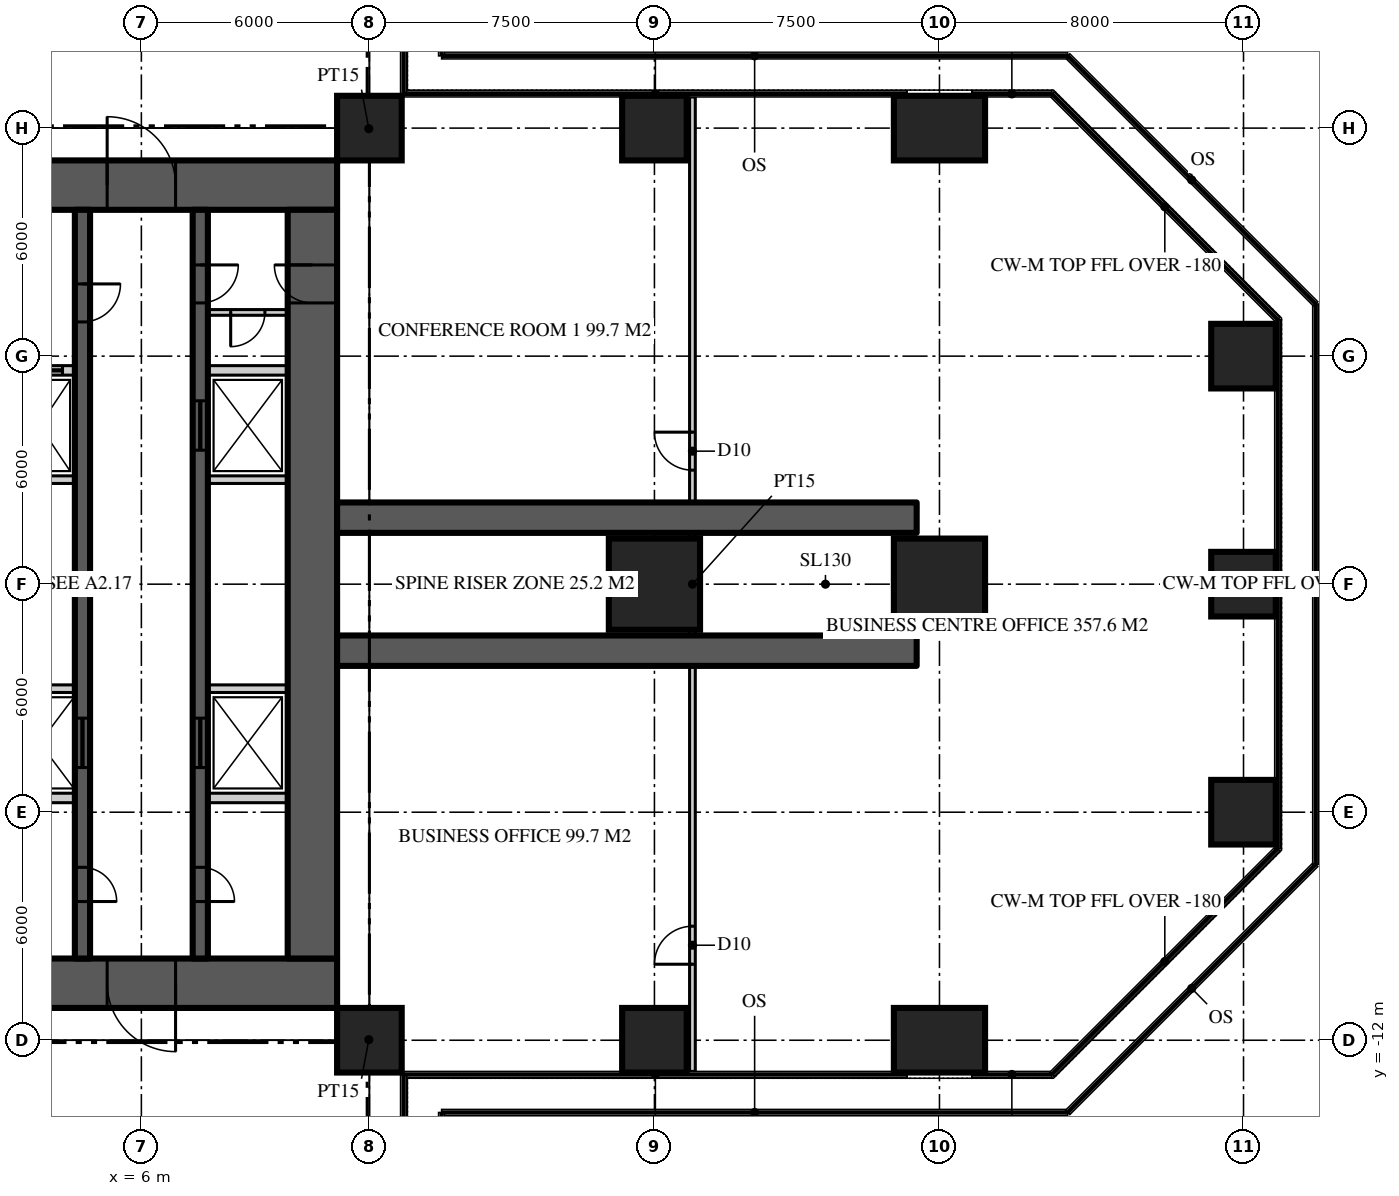
"""IFC4 building model, lengths in metres.
Left out: names, types, materials, properties, quantities, classifications, styles, units other than length and angle.
Written with IfcOpenShell. Run it as: python <this file> out.ifc"""

import sys

from ifc_helpers import new_model, si_unit, direction, frame, frame_2d, origin, origin_2d, place, context, subcontext, project, spatial, rectangle, extrude, element, fill, save


model = new_model("IFC4")
c1 = context("Model", 3, precision=1e-05, world=origin(), true_north=direction((0.0, 1.0)))
c2 = subcontext(c1, "Body", "Model", "MODEL_VIEW")
j1 = project(units=[si_unit("LENGTHUNIT", "METRE"), si_unit("PLANEANGLEUNIT", "RADIAN")], contexts=[c1])
p1 = place(None, origin())
s1 = spatial("IfcSite", under=j1, at=p1, CompositionType="ELEMENT")
p2 = place(p1, origin())
s2 = spatial("IfcBuilding", under=s1, at=p2, CompositionType="ELEMENT")
p3 = place(p2, frame((0.0, 0.0, 113.7)))
s3 = spatial("IfcBuildingStorey", under=s2, at=p3, CompositionType="ELEMENT", Elevation=113.7)
p4 = place(p3, frame((-11.15, 10.5, 0.0), z_axis=(0.0, 0.0, 1.0), x_axis=(1.0, 0.0, 0.0)))
e1 = element("IfcWall", 1, at=p4, inside=s3, PredefinedType="SHEAR", context=c2, shape_type="SweptSolid", body=[
    extrude(rectangle(XDim=22.3, YDim=1.3, at=frame_2d((11.15, 0.0))), origin(), (0.0, 0.0, 1.0), 4.5),
])
p5 = place(p4, frame((4.25, 0.0, 0.0)))
e2 = element("IfcOpeningElement", 2, at=p5, cuts=e1, PredefinedType="OPENING", context=c2, shape_type="SweptSolid", body=[
    extrude(rectangle(XDim=1.8, YDim=2.2, at=frame_2d((0.9, 1.1))), frame((0.0, 0.66, 0.0), z_axis=(0.0, -1.0, 0.0), x_axis=(1.0, 0.0, 0.0)), (0.0, 0.0, 1.0), 1.32),
])
p6 = place(p4, frame((16.25, 0.0, 0.0)))
e3 = element("IfcOpeningElement", 3, at=p6, cuts=e1, PredefinedType="OPENING", context=c2, shape_type="SweptSolid", body=[
    extrude(rectangle(XDim=1.8, YDim=2.2, at=frame_2d((0.9, 1.1))), frame((0.0, 0.66, 0.0), z_axis=(0.0, -1.0, 0.0), x_axis=(1.0, 0.0, 0.0)), (0.0, 0.0, 1.0), 1.32),
])
p7 = place(p3, frame((11.15, -10.5, 0.0), z_axis=(0.0, 0.0, 1.0), x_axis=(-1.0, 0.0, 0.0)))
e4 = element("IfcWall", 4, at=p7, inside=s3, PredefinedType="SHEAR", context=c2, shape_type="SweptSolid", body=[
    extrude(rectangle(XDim=22.3, YDim=1.3, at=frame_2d((11.15, 0.0))), origin(), (0.0, 0.0, 1.0), 4.5),
])
p8 = place(p7, frame((16.25, 0.0, 0.0)))
e5 = element("IfcOpeningElement", 5, at=p8, cuts=e4, PredefinedType="OPENING", context=c2, shape_type="SweptSolid", body=[
    extrude(rectangle(XDim=1.8, YDim=2.2, at=frame_2d((0.9, 1.1))), frame((0.0, 0.66, 0.0), z_axis=(0.0, -1.0, 0.0), x_axis=(1.0, 0.0, 0.0)), (0.0, 0.0, 1.0), 1.32),
])
p9 = place(p7, frame((4.25, 0.0, 0.0)))
e6 = element("IfcOpeningElement", 6, at=p9, cuts=e4, PredefinedType="OPENING", context=c2, shape_type="SweptSolid", body=[
    extrude(rectangle(XDim=1.8, YDim=2.2, at=frame_2d((0.9, 1.1))), frame((0.0, 0.66, 0.0), z_axis=(0.0, -1.0, 0.0), x_axis=(1.0, 0.0, 0.0)), (0.0, 0.0, 1.0), 1.32),
])
p10 = place(p3, frame((10.5, -9.85, 0.0), z_axis=(0.0, 0.0, 1.0), x_axis=(0.0, 1.0, 0.0)))
e7 = element("IfcWall", 7, at=p10, inside=s3, PredefinedType="SHEAR", context=c2, shape_type="SweptSolid", body=[
    extrude(rectangle(XDim=19.7, YDim=1.3, at=frame_2d((9.85, 0.0))), origin(), (0.0, 0.0, 1.0), 4.5),
])
p11 = place(p10, frame((17.25, 0.0, 0.0)))
e8 = element("IfcOpeningElement", 8, at=p11, cuts=e7, PredefinedType="OPENING", context=c2, shape_type="SweptSolid", body=[
    extrude(rectangle(XDim=1.0, YDim=2.2, at=frame_2d((0.5, 1.1))), frame((0.0, 0.66, 0.0), z_axis=(0.0, -1.0, 0.0), x_axis=(1.0, 0.0, 0.0)), (0.0, 0.0, 1.0), 1.32),
])
for number, where, z_axis, x_axis in (
    (9, (11.15, -1.75, 0.0), (0.0, 0.0, 1.0), (1.0, 0.0, 0.0)),
    (10, (11.15, 1.75, 0.0), (0.0, 0.0, 1.0), (1.0, 0.0, 0.0)),
):
    element("IfcWall", number, at=place(p3, frame(where, z_axis=z_axis, x_axis=x_axis)), inside=s3, PredefinedType="SHEAR", context=c2, shape_type="SweptSolid", body=[
        extrude(rectangle(XDim=15.25, YDim=0.8, at=frame_2d((7.625, 0.0))), origin(), (0.0, 0.0, 1.0), 4.5),
    ])
for number, where, z_axis, x_axis in (
    (11, (12.0, -12.0, 0.0), (0.0, 0.0, 1.0), (1.0, 0.0, 0.0)),
    (12, (19.5, -12.0, 0.0), (0.0, 0.0, 1.0), (1.0, 0.0, 0.0)),
):
    element("IfcColumn", number, at=place(p3, frame(where, z_axis=z_axis, x_axis=x_axis)), inside=s3, PredefinedType="COLUMN", context=c2, shape_type="SweptSolid", body=[
        extrude(rectangle(XDim=1.7, YDim=1.7, at=origin_2d()), origin(), (0.0, 0.0, 1.0), 4.5),
    ])
p12 = place(p3, frame((27.0, -12.0, 0.0), z_axis=(0.0, 0.0, 1.0), x_axis=(0.0, 1.0, 0.0)))
e13 = element("IfcColumn", 13, at=p12, inside=s3, PredefinedType="COLUMN", context=c2, shape_type="SweptSolid", body=[
    extrude(rectangle(XDim=1.7, YDim=2.4, at=origin_2d()), origin(), (0.0, 0.0, 1.0), 4.5),
])
p13 = place(p3, frame((35.0, -6.0, 0.0), z_axis=(0.0, 0.0, 1.0), x_axis=(1.0, 0.0, 0.0)))
e14 = element("IfcColumn", 14, at=p13, inside=s3, PredefinedType="COLUMN", context=c2, shape_type="SweptSolid", body=[
    extrude(rectangle(XDim=1.7, YDim=1.7, at=origin_2d()), origin(), (0.0, 0.0, 1.0), 4.5),
])
for number, where, z_axis, x_axis in (
    (15, (19.5, 0.0, 0.0), (0.0, 0.0, 1.0), (1.0, 0.0, 0.0)),
    (16, (27.0, 0.0, 0.0), (0.0, 0.0, 1.0), (1.0, 0.0, 0.0)),
):
    element("IfcColumn", number, at=place(p3, frame(where, z_axis=z_axis, x_axis=x_axis)), inside=s3, PredefinedType="COLUMN", context=c2, shape_type="SweptSolid", body=[
        extrude(rectangle(XDim=2.4, YDim=2.4, at=origin_2d()), origin(), (0.0, 0.0, 1.0), 4.5),
    ])
for number, where, z_axis, x_axis in (
    (17, (35.0, 0.0, 0.0), (0.0, 0.0, 1.0), (1.0, 0.0, 0.0)),
    (18, (35.0, 6.0, 0.0), (0.0, 0.0, 1.0), (1.0, 0.0, 0.0)),
    (19, (12.0, 12.0, 0.0), (0.0, 0.0, 1.0), (1.0, 0.0, 0.0)),
    (20, (19.5, 12.0, 0.0), (0.0, 0.0, 1.0), (1.0, 0.0, 0.0)),
):
    element("IfcColumn", number, at=place(p3, frame(where, z_axis=z_axis, x_axis=x_axis)), inside=s3, PredefinedType="COLUMN", context=c2, shape_type="SweptSolid", body=[
        extrude(rectangle(XDim=1.7, YDim=1.7, at=origin_2d()), origin(), (0.0, 0.0, 1.0), 4.5),
    ])
p14 = place(p3, frame((27.0, 12.0, 0.0), z_axis=(0.0, 0.0, 1.0), x_axis=(0.0, 1.0, 0.0)))
e21 = element("IfcColumn", 21, at=p14, inside=s3, PredefinedType="COLUMN", context=c2, shape_type="SweptSolid", body=[
    extrude(rectangle(XDim=1.7, YDim=2.4, at=origin_2d()), origin(), (0.0, 0.0, 1.0), 4.5),
])
p15 = place(p3, frame((7.55, 9.85, 0.0), z_axis=(0.0, 0.0, 1.0), x_axis=(0.0, -1.0, 0.0)))
e22 = element("IfcWall", 22, at=p15, inside=s3, PredefinedType="SHEAR", context=c2, shape_type="SweptSolid", body=[
    extrude(rectangle(XDim=19.7, YDim=0.4, at=frame_2d((9.85, 0.0))), origin(), (0.0, 0.0, 1.0), 4.5),
])
p16 = place(p15, frame((1.45, 0.0, 0.0)))
e23 = element("IfcOpeningElement", 23, at=p16, cuts=e22, PredefinedType="OPENING", context=c2, shape_type="SweptSolid", body=[
    extrude(rectangle(XDim=1.0, YDim=2.2, at=frame_2d((0.5, 1.1))), frame((0.0, 0.21, 0.0), z_axis=(0.0, -1.0, 0.0), x_axis=(1.0, 0.0, 0.0)), (0.0, 0.0, 1.0), 0.42),
])
p17 = place(p15, frame((17.3, 0.0, 0.0)))
e24 = element("IfcOpeningElement", 24, at=p17, cuts=e22, PredefinedType="OPENING", context=c2, shape_type="SweptSolid", body=[
    extrude(rectangle(XDim=0.9, YDim=2.1, at=frame_2d((0.45, 1.05))), frame((0.0, 0.21, 0.0), z_axis=(0.0, -1.0, 0.0), x_axis=(1.0, 0.0, 0.0)), (0.0, 0.0, 1.0), 0.42),
])
p18 = place(p15, frame((5.025, 0.0, 0.0)))
e25 = element("IfcOpeningElement", 25, at=p18, cuts=e22, PredefinedType="OPENING", context=c2, shape_type="SweptSolid", body=[
    extrude(rectangle(XDim=1.3, YDim=2.2, at=frame_2d((0.65, 1.1))), frame((0.0, 0.21, 0.0), z_axis=(0.0, -1.0, 0.0), x_axis=(1.0, 0.0, 0.0)), (0.0, 0.0, 1.0), 0.42),
])
p19 = place(p15, frame((13.375, 0.0, 0.0)))
e26 = element("IfcOpeningElement", 26, at=p19, cuts=e22, PredefinedType="OPENING", context=c2, shape_type="SweptSolid", body=[
    extrude(rectangle(XDim=1.3, YDim=2.2, at=frame_2d((0.65, 1.1))), frame((0.0, 0.21, 0.0), z_axis=(0.0, -1.0, 0.0), x_axis=(1.0, 0.0, 0.0)), (0.0, 0.0, 1.0), 0.42),
])
p20 = place(p3, frame((4.45, 9.85, 0.0), z_axis=(0.0, 0.0, 1.0), x_axis=(0.0, -1.0, 0.0)))
e27 = element("IfcWall", 27, at=p20, inside=s3, PredefinedType="SHEAR", context=c2, shape_type="SweptSolid", body=[
    extrude(rectangle(XDim=19.7, YDim=0.4, at=frame_2d((9.85, 0.0))), origin(), (0.0, 0.0, 1.0), 4.5),
])
p21 = place(p20, frame((1.95, 0.0, 0.0)))
e28 = element("IfcOpeningElement", 28, at=p21, cuts=e27, PredefinedType="OPENING", context=c2, shape_type="SweptSolid", body=[
    extrude(rectangle(XDim=1.0, YDim=2.2, at=frame_2d((0.5, 1.1))), frame((0.0, 0.21, 0.0), z_axis=(0.0, -1.0, 0.0), x_axis=(1.0, 0.0, 0.0)), (0.0, 0.0, 1.0), 0.42),
])
p22 = place(p20, frame((17.3, 0.0, 0.0)))
e29 = element("IfcOpeningElement", 29, at=p22, cuts=e27, PredefinedType="OPENING", context=c2, shape_type="SweptSolid", body=[
    extrude(rectangle(XDim=0.9, YDim=2.1, at=frame_2d((0.45, 1.05))), frame((0.0, 0.21, 0.0), z_axis=(0.0, -1.0, 0.0), x_axis=(1.0, 0.0, 0.0)), (0.0, 0.0, 1.0), 0.42),
])
p23 = place(p20, frame((13.375, 0.0, 0.0)))
e30 = element("IfcOpeningElement", 30, at=p23, cuts=e27, PredefinedType="OPENING", context=c2, shape_type="SweptSolid", body=[
    extrude(rectangle(XDim=1.3, YDim=2.2, at=frame_2d((0.65, 1.1))), frame((0.0, 0.21, 0.0), z_axis=(0.0, -1.0, 0.0), x_axis=(1.0, 0.0, 0.0)), (0.0, 0.0, 1.0), 0.42),
])
p24 = place(p3, frame((2.4, 5.625, 0.0), z_axis=(0.0, 0.0, 1.0), x_axis=(1.0, 0.0, 0.0)))
e31 = element("IfcWall", 31, at=p24, inside=s3, PredefinedType="SOLIDWALL", context=c2, shape_type="SweptSolid", body=[
    extrude(rectangle(XDim=1.85, YDim=0.25, at=frame_2d((0.925, 0.0))), origin(), (0.0, 0.0, 1.0), 4.3),
])
p25 = place(p24, frame((0.325, 0.0, 0.0)))
e32 = element("IfcOpeningElement", 32, at=p25, cuts=e31, PredefinedType="OPENING", context=c2, shape_type="SweptSolid", body=[
    extrude(rectangle(XDim=1.2, YDim=2.2, at=frame_2d((0.6, 1.1))), frame((0.0, 0.135, 0.0), z_axis=(0.0, -1.0, 0.0), x_axis=(1.0, 0.0, 0.0)), (0.0, 0.0, 1.0), 0.27),
])
p26 = place(p3, frame((7.75, 5.625, 0.0), z_axis=(0.0, 0.0, 1.0), x_axis=(1.0, 0.0, 0.0)))
e33 = element("IfcWall", 33, at=p26, inside=s3, PredefinedType="SOLIDWALL", context=c2, shape_type="SweptSolid", body=[
    extrude(rectangle(XDim=2.1, YDim=0.25, at=frame_2d((1.05, 0.0))), origin(), (0.0, 0.0, 1.0), 4.3),
])
p27 = place(p3, frame((2.4, -5.625, 0.0), z_axis=(0.0, 0.0, 1.0), x_axis=(1.0, 0.0, 0.0)))
e34 = element("IfcWall", 34, at=p27, inside=s3, PredefinedType="SOLIDWALL", context=c2, shape_type="SweptSolid", body=[
    extrude(rectangle(XDim=1.85, YDim=0.25, at=frame_2d((0.925, 0.0))), origin(), (0.0, 0.0, 1.0), 4.3),
])
p28 = place(p3, frame((7.75, -5.625, 0.0), z_axis=(0.0, 0.0, 1.0), x_axis=(1.0, 0.0, 0.0)))
e35 = element("IfcWall", 35, at=p28, inside=s3, PredefinedType="SOLIDWALL", context=c2, shape_type="SweptSolid", body=[
    extrude(rectangle(XDim=2.1, YDim=0.25, at=frame_2d((1.05, 0.0))), origin(), (0.0, 0.0, 1.0), 4.3),
])
p29 = place(p3, frame((2.4, -2.75, 0.0), z_axis=(0.0, 0.0, 1.0), x_axis=(1.0, 0.0, 0.0)))
e36 = element("IfcWall", 36, at=p29, inside=s3, PredefinedType="SOLIDWALL", context=c2, shape_type="SweptSolid", body=[
    extrude(rectangle(XDim=1.85, YDim=0.2, at=frame_2d((0.925, 0.0))), origin(), (0.0, 0.0, 1.0), 4.3),
])
p30 = place(p3, frame((7.75, -2.75, 0.0), z_axis=(0.0, 0.0, 1.0), x_axis=(1.0, 0.0, 0.0)))
e37 = element("IfcWall", 37, at=p30, inside=s3, PredefinedType="SOLIDWALL", context=c2, shape_type="SweptSolid", body=[
    extrude(rectangle(XDim=2.1, YDim=0.2, at=frame_2d((1.05, 0.0))), origin(), (0.0, 0.0, 1.0), 4.3),
])
p31 = place(p3, frame((2.4, 2.75, 0.0), z_axis=(0.0, 0.0, 1.0), x_axis=(1.0, 0.0, 0.0)))
e38 = element("IfcWall", 38, at=p31, inside=s3, PredefinedType="SOLIDWALL", context=c2, shape_type="SweptSolid", body=[
    extrude(rectangle(XDim=1.85, YDim=0.2, at=frame_2d((0.925, 0.0))), origin(), (0.0, 0.0, 1.0), 4.3),
])
p32 = place(p3, frame((7.75, 2.75, 0.0), z_axis=(0.0, 0.0, 1.0), x_axis=(1.0, 0.0, 0.0)))
e39 = element("IfcWall", 39, at=p32, inside=s3, PredefinedType="SOLIDWALL", context=c2, shape_type="SweptSolid", body=[
    extrude(rectangle(XDim=2.1, YDim=0.2, at=frame_2d((1.05, 0.0))), origin(), (0.0, 0.0, 1.0), 4.3),
])
p33 = place(p3, frame((20.5, -12.82, 0.0), z_axis=(0.0, 0.0, 1.0), x_axis=(0.0, 1.0, 0.0)))
e40 = element("IfcWall", 40, at=p33, inside=s3, PredefinedType="PARTITIONING", context=c2, shape_type="SweptSolid", body=[
    extrude(rectangle(XDim=25.64, YDim=0.15, at=frame_2d((12.82, 0.0))), origin(), (0.0, 0.0, 1.0), 4.32),
])
p34 = place(p33, frame((15.82, 0.0, 0.0)))
e41 = element("IfcOpeningElement", 41, at=p34, cuts=e40, PredefinedType="OPENING", context=c2, shape_type="SweptSolid", body=[
    extrude(rectangle(XDim=1.0, YDim=2.2, at=frame_2d((0.5, 1.1))), frame((0.0, 0.085, 0.0), z_axis=(0.0, -1.0, 0.0), x_axis=(1.0, 0.0, 0.0)), (0.0, 0.0, 1.0), 0.17),
])
p35 = place(p33, frame((2.82, 0.0, 0.0)))
e42 = element("IfcOpeningElement", 42, at=p35, cuts=e40, PredefinedType="OPENING", context=c2, shape_type="SweptSolid", body=[
    extrude(rectangle(XDim=1.0, YDim=2.2, at=frame_2d((0.5, 1.1))), frame((0.0, 0.085, 0.0), z_axis=(0.0, -1.0, 0.0), x_axis=(1.0, 0.0, 0.0)), (0.0, 0.0, 1.0), 0.17),
])
for number, where, z_axis, x_axis in (
    (43, (11.15, 11.15, 0.0), (0.0, 0.0, 1.0), (0.707, 0.707, 0.0)),
    (44, (11.15, -11.15, 0.0), (0.0, 0.0, 1.0), (0.707, -0.707, 0.0)),
):
    element("IfcWall", number, at=place(p3, frame(where, z_axis=z_axis, x_axis=x_axis)), inside=s3, PredefinedType="PARTITIONING", context=c2, shape_type="SweptSolid", body=[
        extrude(rectangle(XDim=2.362, YDim=0.15, at=frame_2d((1.181, 0.0))), origin(), (0.0, 0.0, 1.0), 4.32),
    ])
p36 = place(p3, frame((9.85, 7.15, 0.0), z_axis=(0.0, 0.0, 1.0), x_axis=(-1.0, 0.0, 0.0)))
e45 = element("IfcWall", 45, at=p36, inside=s3, PredefinedType="SOLIDWALL", context=c2, shape_type="SweptSolid", body=[
    extrude(rectangle(XDim=2.1, YDim=0.15, at=frame_2d((1.05, 0.0))), origin(), (0.0, 0.0, 1.0), 4.32),
])
p37 = place(p36, frame((0.6, 0.0, 0.0)))
e46 = element("IfcOpeningElement", 46, at=p37, cuts=e45, PredefinedType="OPENING", context=c2, shape_type="SweptSolid", body=[
    extrude(rectangle(XDim=0.9, YDim=2.1, at=frame_2d((0.45, 1.05))), frame((0.0, 0.085, 0.0), z_axis=(0.0, -1.0, 0.0), x_axis=(1.0, 0.0, 0.0)), (0.0, 0.0, 1.0), 0.17),
])
p38 = place(p6, origin())
e47 = element("IfcDoor", 47, at=p38, inside=s3, OperationType="DOUBLE_DOOR_DOUBLE_SWING", PredefinedType="DOOR", context=c2, shape_type="SweptSolid", body=[
    extrude(rectangle(XDim=1.8, YDim=2.2, at=frame_2d((0.9, 1.1))), frame((0.0, 0.025, 0.0), z_axis=(0.0, -1.0, 0.0), x_axis=(1.0, 0.0, 0.0)), (0.0, 0.0, 1.0), 0.05),
])
fill(e3, e47)
p39 = place(p9, origin())
e48 = element("IfcDoor", 48, at=p39, inside=s3, OperationType="DOUBLE_DOOR_DOUBLE_SWING", PredefinedType="DOOR", context=c2, shape_type="SweptSolid", body=[
    extrude(rectangle(XDim=1.8, YDim=2.2, at=frame_2d((0.9, 1.1))), frame((0.0, 0.025, 0.0), z_axis=(0.0, -1.0, 0.0), x_axis=(1.0, 0.0, 0.0)), (0.0, 0.0, 1.0), 0.05),
])
fill(e6, e48)
p40 = place(p16, origin())
e49 = element("IfcDoor", 49, at=p40, inside=s3, OperationType="SINGLE_SWING_LEFT", PredefinedType="DOOR", context=c2, shape_type="SweptSolid", body=[
    extrude(rectangle(XDim=1.0, YDim=2.2, at=frame_2d((0.5, 1.1))), frame((0.0, 0.025, 0.0), z_axis=(0.0, -1.0, 0.0), x_axis=(1.0, 0.0, 0.0)), (0.0, 0.0, 1.0), 0.05),
])
fill(e23, e49)
p41 = place(p11, origin())
e50 = element("IfcDoor", 50, at=p41, inside=s3, OperationType="SINGLE_SWING_RIGHT", PredefinedType="DOOR", context=c2, shape_type="SweptSolid", body=[
    extrude(rectangle(XDim=1.0, YDim=2.2, at=frame_2d((0.5, 1.1))), frame((0.0, 0.025, 0.0), z_axis=(0.0, -1.0, 0.0), x_axis=(1.0, 0.0, 0.0)), (0.0, 0.0, 1.0), 0.05),
])
fill(e8, e50)
p42 = place(p21, origin())
e51 = element("IfcDoor", 51, at=p42, inside=s3, OperationType="SINGLE_SWING_LEFT", PredefinedType="DOOR", context=c2, shape_type="SweptSolid", body=[
    extrude(rectangle(XDim=1.0, YDim=2.2, at=frame_2d((0.5, 1.1))), frame((0.0, 0.025, 0.0), z_axis=(0.0, -1.0, 0.0), x_axis=(1.0, 0.0, 0.0)), (0.0, 0.0, 1.0), 0.05),
])
fill(e28, e51)
p43 = place(p17, origin())
e52 = element("IfcDoor", 52, at=p43, inside=s3, OperationType="SINGLE_SWING_RIGHT", PredefinedType="DOOR", context=c2, shape_type="SweptSolid", body=[
    extrude(rectangle(XDim=0.9, YDim=2.1, at=frame_2d((0.45, 1.05))), frame((0.0, 0.025, 0.0), z_axis=(0.0, -1.0, 0.0), x_axis=(1.0, 0.0, 0.0)), (0.0, 0.0, 1.0), 0.05),
])
fill(e24, e52)
p44 = place(p22, origin())
e53 = element("IfcDoor", 53, at=p44, inside=s3, OperationType="SINGLE_SWING_RIGHT", PredefinedType="DOOR", context=c2, shape_type="SweptSolid", body=[
    extrude(rectangle(XDim=0.9, YDim=2.1, at=frame_2d((0.45, 1.05))), frame((0.0, 0.025, 0.0), z_axis=(0.0, -1.0, 0.0), x_axis=(1.0, 0.0, 0.0)), (0.0, 0.0, 1.0), 0.05),
])
fill(e29, e53)
p45 = place(p18, origin())
e54 = element("IfcDoor", 54, at=p45, inside=s3, OperationType="SLIDING_TO_LEFT", PredefinedType="DOOR", context=c2, shape_type="SweptSolid", body=[
    extrude(rectangle(XDim=1.3, YDim=2.2, at=frame_2d((0.65, 1.1))), frame((0.0, 0.025, 0.0), z_axis=(0.0, -1.0, 0.0), x_axis=(1.0, 0.0, 0.0)), (0.0, 0.0, 1.0), 0.05),
])
fill(e25, e54)
p46 = place(p19, origin())
e55 = element("IfcDoor", 55, at=p46, inside=s3, OperationType="SLIDING_TO_LEFT", PredefinedType="DOOR", context=c2, shape_type="SweptSolid", body=[
    extrude(rectangle(XDim=1.3, YDim=2.2, at=frame_2d((0.65, 1.1))), frame((0.0, 0.025, 0.0), z_axis=(0.0, -1.0, 0.0), x_axis=(1.0, 0.0, 0.0)), (0.0, 0.0, 1.0), 0.05),
])
fill(e26, e55)
p47 = place(p23, origin())
e56 = element("IfcDoor", 56, at=p47, inside=s3, OperationType="SLIDING_TO_LEFT", PredefinedType="DOOR", context=c2, shape_type="SweptSolid", body=[
    extrude(rectangle(XDim=1.3, YDim=2.2, at=frame_2d((0.65, 1.1))), frame((0.0, 0.025, 0.0), z_axis=(0.0, -1.0, 0.0), x_axis=(1.0, 0.0, 0.0)), (0.0, 0.0, 1.0), 0.05),
])
fill(e30, e56)
p48 = place(p25, origin())
e57 = element("IfcDoor", 57, at=p48, inside=s3, OperationType="SLIDING_TO_LEFT", PredefinedType="DOOR", context=c2, shape_type="SweptSolid", body=[
    extrude(rectangle(XDim=1.2, YDim=2.2, at=frame_2d((0.6, 1.1))), frame((0.0, 0.025, 0.0), z_axis=(0.0, -1.0, 0.0), x_axis=(1.0, 0.0, 0.0)), (0.0, 0.0, 1.0), 0.05),
])
fill(e32, e57)
p49 = place(p34, origin())
e58 = element("IfcDoor", 58, at=p49, inside=s3, OperationType="SINGLE_SWING_RIGHT", PredefinedType="DOOR", context=c2, shape_type="SweptSolid", body=[
    extrude(rectangle(XDim=1.0, YDim=2.2, at=frame_2d((0.5, 1.1))), frame((0.0, 0.025, 0.0), z_axis=(0.0, -1.0, 0.0), x_axis=(1.0, 0.0, 0.0)), (0.0, 0.0, 1.0), 0.05),
])
fill(e41, e58)
p50 = place(p35, origin())
e59 = element("IfcDoor", 59, at=p50, inside=s3, OperationType="SINGLE_SWING_LEFT", PredefinedType="DOOR", context=c2, shape_type="SweptSolid", body=[
    extrude(rectangle(XDim=1.0, YDim=2.2, at=frame_2d((0.5, 1.1))), frame((0.0, 0.025, 0.0), z_axis=(0.0, -1.0, 0.0), x_axis=(1.0, 0.0, 0.0)), (0.0, 0.0, 1.0), 0.05),
])
fill(e42, e59)
p51 = place(p37, origin())
e60 = element("IfcDoor", 60, at=p51, inside=s3, OperationType="SINGLE_SWING_RIGHT", PredefinedType="DOOR", context=c2, shape_type="SweptSolid", body=[
    extrude(rectangle(XDim=0.9, YDim=2.1, at=frame_2d((0.45, 1.05))), frame((0.0, 0.025, 0.0), z_axis=(0.0, -1.0, 0.0), x_axis=(1.0, 0.0, 0.0)), (0.0, 0.0, 1.0), 0.05),
])
fill(e46, e60)
save(model, sys.argv[1])
